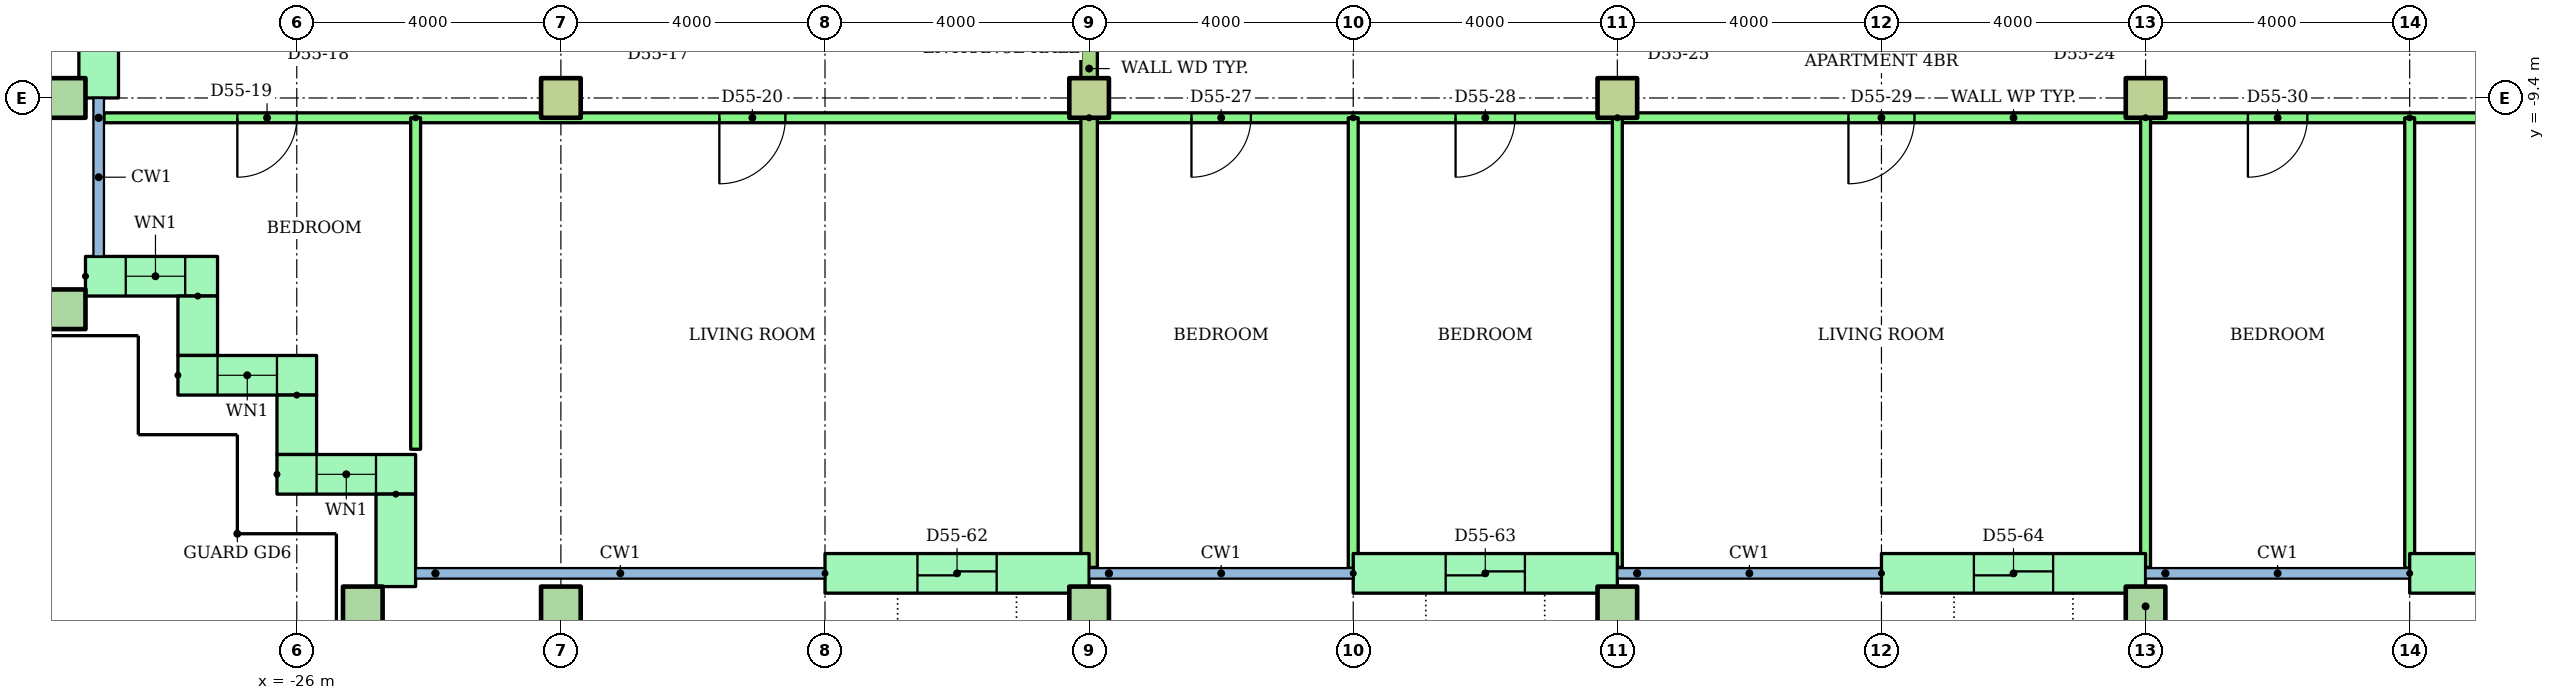
"""IFC4 building model, lengths in metres.
Left out: names, types, materials, properties, quantities, classifications, styles, units other than length and angle.
Written with IfcOpenShell. Run it as: python <this file> out.ifc"""

import sys

from ifc_helpers import new_model, si_unit, direction, frame, frame_2d, origin, origin_2d, place, context, subcontext, project, spatial, rectangle, hollow_rectangle, extrude, element, fill, save


model = new_model("IFC4")
c1 = context("Model", 3, precision=1e-05, world=origin(), true_north=direction((0.0, 1.0)))
c2 = subcontext(c1, "Body", "Model", "MODEL_VIEW")
j1 = project(units=[si_unit("LENGTHUNIT", "METRE"), si_unit("PLANEANGLEUNIT", "RADIAN")], contexts=[c1])
p1 = place(None, origin())
s1 = spatial("IfcSite", under=j1, at=p1, CompositionType="ELEMENT")
p2 = place(p1, origin())
s2 = spatial("IfcBuilding", under=s1, at=p2, CompositionType="ELEMENT")
p3 = place(p2, frame((0.0, 0.0, 214.0)))
s3 = spatial("IfcBuildingStorey", under=s2, at=p3, CompositionType="ELEMENT", Elevation=214.0)
for number, where in (
    (1, (-25.0, -17.1, 0.0)),
    (2, (-22.0, -17.1, 0.0)),
    (3, (-14.0, -17.1, 0.0)),
    (4, (-6.0, -17.1, 0.0)),
    (5, (2.0, -17.1, 0.0)),
    (6, (-29.5, -12.6, 0.0)),
    (7, (-29.5, -9.4, 0.0)),
):
    element("IfcColumn", number, at=place(p3, frame(where)), inside=s3, PredefinedType="COLUMN", context=c2, shape_type="SweptSolid", body=[
        extrude(hollow_rectangle(XDim=0.6, YDim=0.6, WallThickness=0.03, at=origin_2d()), origin(), (0.0, 0.0, 1.0), 3.2),
    ])
for number, where in (
    (8, (-22.0, -9.4, 0.0)),
    (9, (-14.0, -9.4, 0.0)),
    (10, (-6.0, -9.4, 0.0)),
    (11, (2.0, -9.4, 0.0)),
):
    element("IfcColumn", number, at=place(p3, frame(where)), inside=s3, PredefinedType="COLUMN", context=c2, shape_type="SweptSolid", body=[
        extrude(rectangle(XDim=0.6, YDim=0.6, at=origin_2d()), origin(), (0.0, 0.0, 1.0), 3.2),
    ])
p4 = place(p3, frame((-29.0, -5.7, 0.0), z_axis=(0.0, 0.0, 1.0), x_axis=(0.0, -1.0, 0.0)))
e12 = element("IfcWall", 12, at=p4, inside=s3, PredefinedType="STANDARD", context=c2, shape_type="SweptSolid", body=[
    extrude(rectangle(XDim=3.7, YDim=0.6, at=frame_2d((1.85, 0.0))), origin(), (0.0, 0.0, 1.0), 2.92),
])
p5 = place(p4, frame((1.125, 0.0, 0.0)))
e13 = element("IfcOpeningElement", 13, at=p5, cuts=e12, PredefinedType="OPENING", context=c2, shape_type="SweptSolid", body=[
    extrude(rectangle(XDim=1.2, YDim=2.1, at=frame_2d((0.6, 1.05))), frame((0.0, 0.31, 0.0), z_axis=(0.0, -1.0, 0.0), x_axis=(1.0, 0.0, 0.0)), (0.0, 0.0, 1.0), 0.62),
])
p6 = place(p3, frame((-29.2, -12.1, 0.0)))
e14 = element("IfcWall", 14, at=p6, inside=s3, PredefinedType="STANDARD", context=c2, shape_type="SweptSolid", body=[
    extrude(rectangle(XDim=2.0, YDim=0.6, at=frame_2d((1.0, 0.0))), origin(), (0.0, 0.0, 1.0), 2.92),
])
p7 = place(p6, frame((0.61, 0.0, 0.9)))
e15 = element("IfcOpeningElement", 15, at=p7, cuts=e14, PredefinedType="OPENING", context=c2, shape_type="SweptSolid", body=[
    extrude(rectangle(XDim=0.9, YDim=1.5, at=frame_2d((0.45, 0.75))), frame((0.0, 0.31, 0.0), z_axis=(0.0, -1.0, 0.0), x_axis=(1.0, 0.0, 0.0)), (0.0, 0.0, 1.0), 0.62),
])
p8 = place(p3, frame((-27.5, -12.4, 0.0), z_axis=(0.0, 0.0, 1.0), x_axis=(0.0, -1.0, 0.0)))
e16 = element("IfcWall", 16, at=p8, inside=s3, PredefinedType="STANDARD", context=c2, shape_type="SweptSolid", body=[
    extrude(rectangle(XDim=0.9, YDim=0.6, at=frame_2d((0.45, 0.0))), origin(), (0.0, 0.0, 1.0), 2.92),
])
p9 = place(p3, frame((-27.8, -13.6, 0.0)))
e17 = element("IfcWall", 17, at=p9, inside=s3, PredefinedType="STANDARD", context=c2, shape_type="SweptSolid", body=[
    extrude(rectangle(XDim=2.1, YDim=0.6, at=frame_2d((1.05, 0.0))), origin(), (0.0, 0.0, 1.0), 2.92),
])
p10 = place(p9, frame((0.6, 0.0, 0.9)))
e18 = element("IfcOpeningElement", 18, at=p10, cuts=e17, PredefinedType="OPENING", context=c2, shape_type="SweptSolid", body=[
    extrude(rectangle(XDim=0.9, YDim=1.5, at=frame_2d((0.45, 0.75))), frame((0.0, 0.31, 0.0), z_axis=(0.0, -1.0, 0.0), x_axis=(1.0, 0.0, 0.0)), (0.0, 0.0, 1.0), 0.62),
])
p11 = place(p3, frame((-26.0, -13.9, 0.0), z_axis=(0.0, 0.0, 1.0), x_axis=(0.0, -1.0, 0.0)))
e19 = element("IfcWall", 19, at=p11, inside=s3, PredefinedType="STANDARD", context=c2, shape_type="SweptSolid", body=[
    extrude(rectangle(XDim=0.9, YDim=0.6, at=frame_2d((0.45, 0.0))), origin(), (0.0, 0.0, 1.0), 2.92),
])
p12 = place(p3, frame((-26.3, -15.1, 0.0)))
e20 = element("IfcWall", 20, at=p12, inside=s3, PredefinedType="STANDARD", context=c2, shape_type="SweptSolid", body=[
    extrude(rectangle(XDim=2.1, YDim=0.6, at=frame_2d((1.05, 0.0))), origin(), (0.0, 0.0, 1.0), 2.92),
])
p13 = place(p12, frame((0.6, 0.0, 0.9)))
e21 = element("IfcOpeningElement", 21, at=p13, cuts=e20, PredefinedType="OPENING", context=c2, shape_type="SweptSolid", body=[
    extrude(rectangle(XDim=0.9, YDim=1.5, at=frame_2d((0.45, 0.75))), frame((0.0, 0.31, 0.0), z_axis=(0.0, -1.0, 0.0), x_axis=(1.0, 0.0, 0.0)), (0.0, 0.0, 1.0), 0.62),
])
p14 = place(p3, frame((-24.5, -15.4, 0.0), z_axis=(0.0, 0.0, 1.0), x_axis=(0.0, -1.0, 0.0)))
e22 = element("IfcWall", 22, at=p14, inside=s3, PredefinedType="STANDARD", context=c2, shape_type="SweptSolid", body=[
    extrude(rectangle(XDim=1.4, YDim=0.6, at=frame_2d((0.7, 0.0))), origin(), (0.0, 0.0, 1.0), 2.92),
])
p15 = place(p3, frame((-18.0, -16.6, 0.0)))
e23 = element("IfcWall", 23, at=p15, inside=s3, PredefinedType="STANDARD", context=c2, shape_type="SweptSolid", body=[
    extrude(rectangle(XDim=4.0, YDim=0.6, at=frame_2d((2.0, 0.0))), origin(), (0.0, 0.0, 1.0), 2.92),
])
p16 = place(p15, frame((1.4, 0.0, 0.0)))
e24 = element("IfcOpeningElement", 24, at=p16, cuts=e23, PredefinedType="OPENING", context=c2, shape_type="SweptSolid", body=[
    extrude(rectangle(XDim=1.2, YDim=2.1, at=frame_2d((0.6, 1.05))), frame((0.0, 0.31, 0.0), z_axis=(0.0, -1.0, 0.0), x_axis=(1.0, 0.0, 0.0)), (0.0, 0.0, 1.0), 0.62),
])
p17 = place(p3, frame((-10.0, -16.6, 0.0)))
e25 = element("IfcWall", 25, at=p17, inside=s3, PredefinedType="STANDARD", context=c2, shape_type="SweptSolid", body=[
    extrude(rectangle(XDim=4.0, YDim=0.6, at=frame_2d((2.0, 0.0))), origin(), (0.0, 0.0, 1.0), 2.92),
])
p18 = place(p17, frame((1.4, 0.0, 0.0)))
e26 = element("IfcOpeningElement", 26, at=p18, cuts=e25, PredefinedType="OPENING", context=c2, shape_type="SweptSolid", body=[
    extrude(rectangle(XDim=1.2, YDim=2.1, at=frame_2d((0.6, 1.05))), frame((0.0, 0.31, 0.0), z_axis=(0.0, -1.0, 0.0), x_axis=(1.0, 0.0, 0.0)), (0.0, 0.0, 1.0), 0.62),
])
p19 = place(p3, frame((-2.0, -16.6, 0.0)))
e27 = element("IfcWall", 27, at=p19, inside=s3, PredefinedType="STANDARD", context=c2, shape_type="SweptSolid", body=[
    extrude(rectangle(XDim=4.0, YDim=0.6, at=frame_2d((2.0, 0.0))), origin(), (0.0, 0.0, 1.0), 2.92),
])
p20 = place(p19, frame((1.4, 0.0, 0.0)))
e28 = element("IfcOpeningElement", 28, at=p20, cuts=e27, PredefinedType="OPENING", context=c2, shape_type="SweptSolid", body=[
    extrude(rectangle(XDim=1.2, YDim=2.1, at=frame_2d((0.6, 1.05))), frame((0.0, 0.31, 0.0), z_axis=(0.0, -1.0, 0.0), x_axis=(1.0, 0.0, 0.0)), (0.0, 0.0, 1.0), 0.62),
])
p21 = place(p3, frame((6.0, -16.6, 0.0)))
e29 = element("IfcWall", 29, at=p21, inside=s3, PredefinedType="STANDARD", context=c2, shape_type="SweptSolid", body=[
    extrude(rectangle(XDim=4.0, YDim=0.6, at=frame_2d((2.0, 0.0))), origin(), (0.0, 0.0, 1.0), 2.92),
])
p22 = place(p21, frame((1.4, 0.0, 0.0)))
e30 = element("IfcOpeningElement", 30, at=p22, cuts=e29, PredefinedType="OPENING", context=c2, shape_type="SweptSolid", body=[
    extrude(rectangle(XDim=1.2, YDim=2.1, at=frame_2d((0.6, 1.05))), frame((0.0, 0.31, 0.0), z_axis=(0.0, -1.0, 0.0), x_axis=(1.0, 0.0, 0.0)), (0.0, 0.0, 1.0), 0.62),
])
p23 = place(p3, frame((-14.0, -9.7, 0.0), z_axis=(0.0, 0.0, 1.0), x_axis=(-1.0, 0.0, 0.0)))
e31 = element("IfcWall", 31, at=p23, inside=s3, PredefinedType="PARTITIONING", context=c2, shape_type="SweptSolid", body=[
    extrude(rectangle(XDim=14.92, YDim=0.15, at=frame_2d((7.46, 0.0))), origin(), (0.0, 0.0, 1.0), 2.4),
])
p24 = place(p23, frame((12.0, 0.0, 0.0)))
e32 = element("IfcOpeningElement", 32, at=p24, cuts=e31, PredefinedType="OPENING", context=c2, shape_type="SweptSolid", body=[
    extrude(rectangle(XDim=0.9, YDim=2.1, at=frame_2d((0.45, 1.05))), frame((0.0, 0.085, 0.0), z_axis=(0.0, -1.0, 0.0), x_axis=(1.0, 0.0, 0.0)), (0.0, 0.0, 1.0), 0.17),
])
p25 = place(p23, frame((4.6, 0.0, 0.0)))
e33 = element("IfcOpeningElement", 33, at=p25, cuts=e31, PredefinedType="OPENING", context=c2, shape_type="SweptSolid", body=[
    extrude(rectangle(XDim=1.0, YDim=2.1, at=frame_2d((0.5, 1.05))), frame((0.0, 0.085, 0.0), z_axis=(0.0, -1.0, 0.0), x_axis=(1.0, 0.0, 0.0)), (0.0, 0.0, 1.0), 0.17),
])
p26 = place(p3, frame((-24.2, -9.7, 0.0), z_axis=(0.0, 0.0, 1.0), x_axis=(0.0, -1.0, 0.0)))
e34 = element("IfcWall", 34, at=p26, inside=s3, PredefinedType="PARTITIONING", context=c2, shape_type="SweptSolid", body=[
    extrude(rectangle(XDim=5.02, YDim=0.15, at=frame_2d((2.51, 0.0))), origin(), (0.0, 0.0, 1.0), 2.4),
])
p27 = place(p3, frame((10.0, -9.7, 0.0), z_axis=(0.0, 0.0, 1.0), x_axis=(-1.0, 0.0, 0.0)))
e35 = element("IfcWall", 35, at=p27, inside=s3, PredefinedType="PARTITIONING", context=c2, shape_type="SweptSolid", body=[
    extrude(rectangle(XDim=24.0, YDim=0.15, at=frame_2d((12.0, 0.0))), origin(), (0.0, 0.0, 1.0), 2.4),
])
p28 = place(p27, frame((21.55, 0.0, 0.0)))
e36 = element("IfcOpeningElement", 36, at=p28, cuts=e35, PredefinedType="OPENING", context=c2, shape_type="SweptSolid", body=[
    extrude(rectangle(XDim=0.9, YDim=2.1, at=frame_2d((0.45, 1.05))), frame((0.0, 0.085, 0.0), z_axis=(0.0, -1.0, 0.0), x_axis=(1.0, 0.0, 0.0)), (0.0, 0.0, 1.0), 0.17),
])
p29 = place(p27, frame((17.55, 0.0, 0.0)))
e37 = element("IfcOpeningElement", 37, at=p29, cuts=e35, PredefinedType="OPENING", context=c2, shape_type="SweptSolid", body=[
    extrude(rectangle(XDim=0.9, YDim=2.1, at=frame_2d((0.45, 1.05))), frame((0.0, 0.085, 0.0), z_axis=(0.0, -1.0, 0.0), x_axis=(1.0, 0.0, 0.0)), (0.0, 0.0, 1.0), 0.17),
])
p30 = place(p27, frame((11.5, 0.0, 0.0)))
e38 = element("IfcOpeningElement", 38, at=p30, cuts=e35, PredefinedType="OPENING", context=c2, shape_type="SweptSolid", body=[
    extrude(rectangle(XDim=1.0, YDim=2.1, at=frame_2d((0.5, 1.05))), frame((0.0, 0.085, 0.0), z_axis=(0.0, -1.0, 0.0), x_axis=(1.0, 0.0, 0.0)), (0.0, 0.0, 1.0), 0.17),
])
p31 = place(p27, frame((5.55, 0.0, 0.0)))
e39 = element("IfcOpeningElement", 39, at=p31, cuts=e35, PredefinedType="OPENING", context=c2, shape_type="SweptSolid", body=[
    extrude(rectangle(XDim=0.9, YDim=2.1, at=frame_2d((0.45, 1.05))), frame((0.0, 0.085, 0.0), z_axis=(0.0, -1.0, 0.0), x_axis=(1.0, 0.0, 0.0)), (0.0, 0.0, 1.0), 0.17),
])
p32 = place(p27, frame((1.55, 0.0, 0.0)))
e40 = element("IfcOpeningElement", 40, at=p32, cuts=e35, PredefinedType="OPENING", context=c2, shape_type="SweptSolid", body=[
    extrude(rectangle(XDim=0.9, YDim=2.1, at=frame_2d((0.45, 1.05))), frame((0.0, 0.085, 0.0), z_axis=(0.0, -1.0, 0.0), x_axis=(1.0, 0.0, 0.0)), (0.0, 0.0, 1.0), 0.17),
])
p33 = place(p3, frame((-10.0, -9.7, 0.0), z_axis=(0.0, 0.0, 1.0), x_axis=(0.0, -1.0, 0.0)))
e41 = element("IfcWall", 41, at=p33, inside=s3, PredefinedType="PARTITIONING", context=c2, shape_type="SweptSolid", body=[
    extrude(rectangle(XDim=6.821, YDim=0.15, at=frame_2d((3.411, 0.0))), origin(), (0.0, 0.0, 1.0), 2.4),
])
for number, where, z_axis, x_axis in (
    (42, (-6.0, -9.7, 0.0), (0.0, 0.0, 1.0), (0.0, -1.0, 0.0)),
    (43, (2.0, -9.7, 0.0), (0.0, 0.0, 1.0), (0.0, -1.0, 0.0)),
):
    element("IfcWall", number, at=place(p3, frame(where, z_axis=z_axis, x_axis=x_axis)), inside=s3, PredefinedType="PARTITIONING", context=c2, shape_type="SweptSolid", body=[
        extrude(rectangle(XDim=6.81, YDim=0.15, at=frame_2d((3.405, 0.0))), origin(), (0.0, 0.0, 1.0), 2.4),
    ])
p34 = place(p3, frame((6.0, -9.7, 0.0), z_axis=(0.0, 0.0, 1.0), x_axis=(0.0, -1.0, 0.0)))
e44 = element("IfcWall", 44, at=p34, inside=s3, PredefinedType="PARTITIONING", context=c2, shape_type="SweptSolid", body=[
    extrude(rectangle(XDim=6.821, YDim=0.15, at=frame_2d((3.411, 0.0))), origin(), (0.0, 0.0, 1.0), 2.4),
])
p35 = place(p3, frame((-14.0, -1.4, 0.0), z_axis=(0.0, 0.0, 1.0), x_axis=(0.0, -1.0, 0.0)))
e45 = element("IfcWall", 45, at=p35, inside=s3, PredefinedType="PARTITIONING", context=c2, shape_type="SweptSolid", body=[
    extrude(rectangle(XDim=15.11, YDim=0.25, at=frame_2d((7.555, 0.0))), origin(), (0.0, 0.0, 1.0), 2.4),
])
p36 = place(p7, origin())
e46 = element("IfcWindow", 46, at=p36, inside=s3, PartitioningType="SINGLE_PANEL", PredefinedType="WINDOW", context=c2, shape_type="SweptSolid", body=[
    extrude(rectangle(XDim=0.9, YDim=1.5, at=frame_2d((0.45, 0.75))), frame((0.0, 0.03, 0.0), z_axis=(0.0, -1.0, 0.0), x_axis=(1.0, 0.0, 0.0)), (0.0, 0.0, 1.0), 0.06),
])
fill(e15, e46)
p37 = place(p10, origin())
e47 = element("IfcWindow", 47, at=p37, inside=s3, PartitioningType="SINGLE_PANEL", PredefinedType="WINDOW", context=c2, shape_type="SweptSolid", body=[
    extrude(rectangle(XDim=0.9, YDim=1.5, at=frame_2d((0.45, 0.75))), frame((0.0, 0.03, 0.0), z_axis=(0.0, -1.0, 0.0), x_axis=(1.0, 0.0, 0.0)), (0.0, 0.0, 1.0), 0.06),
])
fill(e18, e47)
p38 = place(p13, origin())
e48 = element("IfcWindow", 48, at=p38, inside=s3, PartitioningType="SINGLE_PANEL", PredefinedType="WINDOW", context=c2, shape_type="SweptSolid", body=[
    extrude(rectangle(XDim=0.9, YDim=1.5, at=frame_2d((0.45, 0.75))), frame((0.0, 0.03, 0.0), z_axis=(0.0, -1.0, 0.0), x_axis=(1.0, 0.0, 0.0)), (0.0, 0.0, 1.0), 0.06),
])
fill(e21, e48)
p39 = place(p24, origin())
e49 = element("IfcDoor", 49, at=p39, inside=s3, OperationType="SINGLE_SWING_RIGHT", PredefinedType="DOOR", context=c2, shape_type="SweptSolid", body=[
    extrude(rectangle(XDim=0.9, YDim=2.1, at=frame_2d((0.45, 1.05))), frame((0.0, 0.025, 0.0), z_axis=(0.0, -1.0, 0.0), x_axis=(1.0, 0.0, 0.0)), (0.0, 0.0, 1.0), 0.05),
])
fill(e32, e49)
p40 = place(p25, origin())
e50 = element("IfcDoor", 50, at=p40, inside=s3, OperationType="SINGLE_SWING_RIGHT", PredefinedType="DOOR", context=c2, shape_type="SweptSolid", body=[
    extrude(rectangle(XDim=1.0, YDim=2.1, at=frame_2d((0.5, 1.05))), frame((0.0, 0.025, 0.0), z_axis=(0.0, -1.0, 0.0), x_axis=(1.0, 0.0, 0.0)), (0.0, 0.0, 1.0), 0.05),
])
fill(e33, e50)
p41 = place(p28, origin())
e51 = element("IfcDoor", 51, at=p41, inside=s3, OperationType="SINGLE_SWING_RIGHT", PredefinedType="DOOR", context=c2, shape_type="SweptSolid", body=[
    extrude(rectangle(XDim=0.9, YDim=2.1, at=frame_2d((0.45, 1.05))), frame((0.0, 0.025, 0.0), z_axis=(0.0, -1.0, 0.0), x_axis=(1.0, 0.0, 0.0)), (0.0, 0.0, 1.0), 0.05),
])
fill(e36, e51)
p42 = place(p29, origin())
e52 = element("IfcDoor", 52, at=p42, inside=s3, OperationType="SINGLE_SWING_RIGHT", PredefinedType="DOOR", context=c2, shape_type="SweptSolid", body=[
    extrude(rectangle(XDim=0.9, YDim=2.1, at=frame_2d((0.45, 1.05))), frame((0.0, 0.025, 0.0), z_axis=(0.0, -1.0, 0.0), x_axis=(1.0, 0.0, 0.0)), (0.0, 0.0, 1.0), 0.05),
])
fill(e37, e52)
p43 = place(p30, origin())
e53 = element("IfcDoor", 53, at=p43, inside=s3, OperationType="SINGLE_SWING_RIGHT", PredefinedType="DOOR", context=c2, shape_type="SweptSolid", body=[
    extrude(rectangle(XDim=1.0, YDim=2.1, at=frame_2d((0.5, 1.05))), frame((0.0, 0.025, 0.0), z_axis=(0.0, -1.0, 0.0), x_axis=(1.0, 0.0, 0.0)), (0.0, 0.0, 1.0), 0.05),
])
fill(e38, e53)
p44 = place(p31, origin())
e54 = element("IfcDoor", 54, at=p44, inside=s3, OperationType="SINGLE_SWING_RIGHT", PredefinedType="DOOR", context=c2, shape_type="SweptSolid", body=[
    extrude(rectangle(XDim=0.9, YDim=2.1, at=frame_2d((0.45, 1.05))), frame((0.0, 0.025, 0.0), z_axis=(0.0, -1.0, 0.0), x_axis=(1.0, 0.0, 0.0)), (0.0, 0.0, 1.0), 0.05),
])
fill(e39, e54)
p45 = place(p16, origin())
e55 = element("IfcDoor", 55, at=p45, inside=s3, OperationType="SLIDING_TO_LEFT", PredefinedType="DOOR", context=c2, shape_type="SweptSolid", body=[
    extrude(rectangle(XDim=1.2, YDim=2.1, at=frame_2d((0.6, 1.05))), frame((0.0, 0.025, 0.0), z_axis=(0.0, -1.0, 0.0), x_axis=(1.0, 0.0, 0.0)), (0.0, 0.0, 1.0), 0.05),
])
fill(e24, e55)
p46 = place(p18, origin())
e56 = element("IfcDoor", 56, at=p46, inside=s3, OperationType="SLIDING_TO_LEFT", PredefinedType="DOOR", context=c2, shape_type="SweptSolid", body=[
    extrude(rectangle(XDim=1.2, YDim=2.1, at=frame_2d((0.6, 1.05))), frame((0.0, 0.025, 0.0), z_axis=(0.0, -1.0, 0.0), x_axis=(1.0, 0.0, 0.0)), (0.0, 0.0, 1.0), 0.05),
])
fill(e26, e56)
p47 = place(p20, origin())
e57 = element("IfcDoor", 57, at=p47, inside=s3, OperationType="SLIDING_TO_LEFT", PredefinedType="DOOR", context=c2, shape_type="SweptSolid", body=[
    extrude(rectangle(XDim=1.2, YDim=2.1, at=frame_2d((0.6, 1.05))), frame((0.0, 0.025, 0.0), z_axis=(0.0, -1.0, 0.0), x_axis=(1.0, 0.0, 0.0)), (0.0, 0.0, 1.0), 0.05),
])
fill(e28, e57)
save(model, sys.argv[1])
